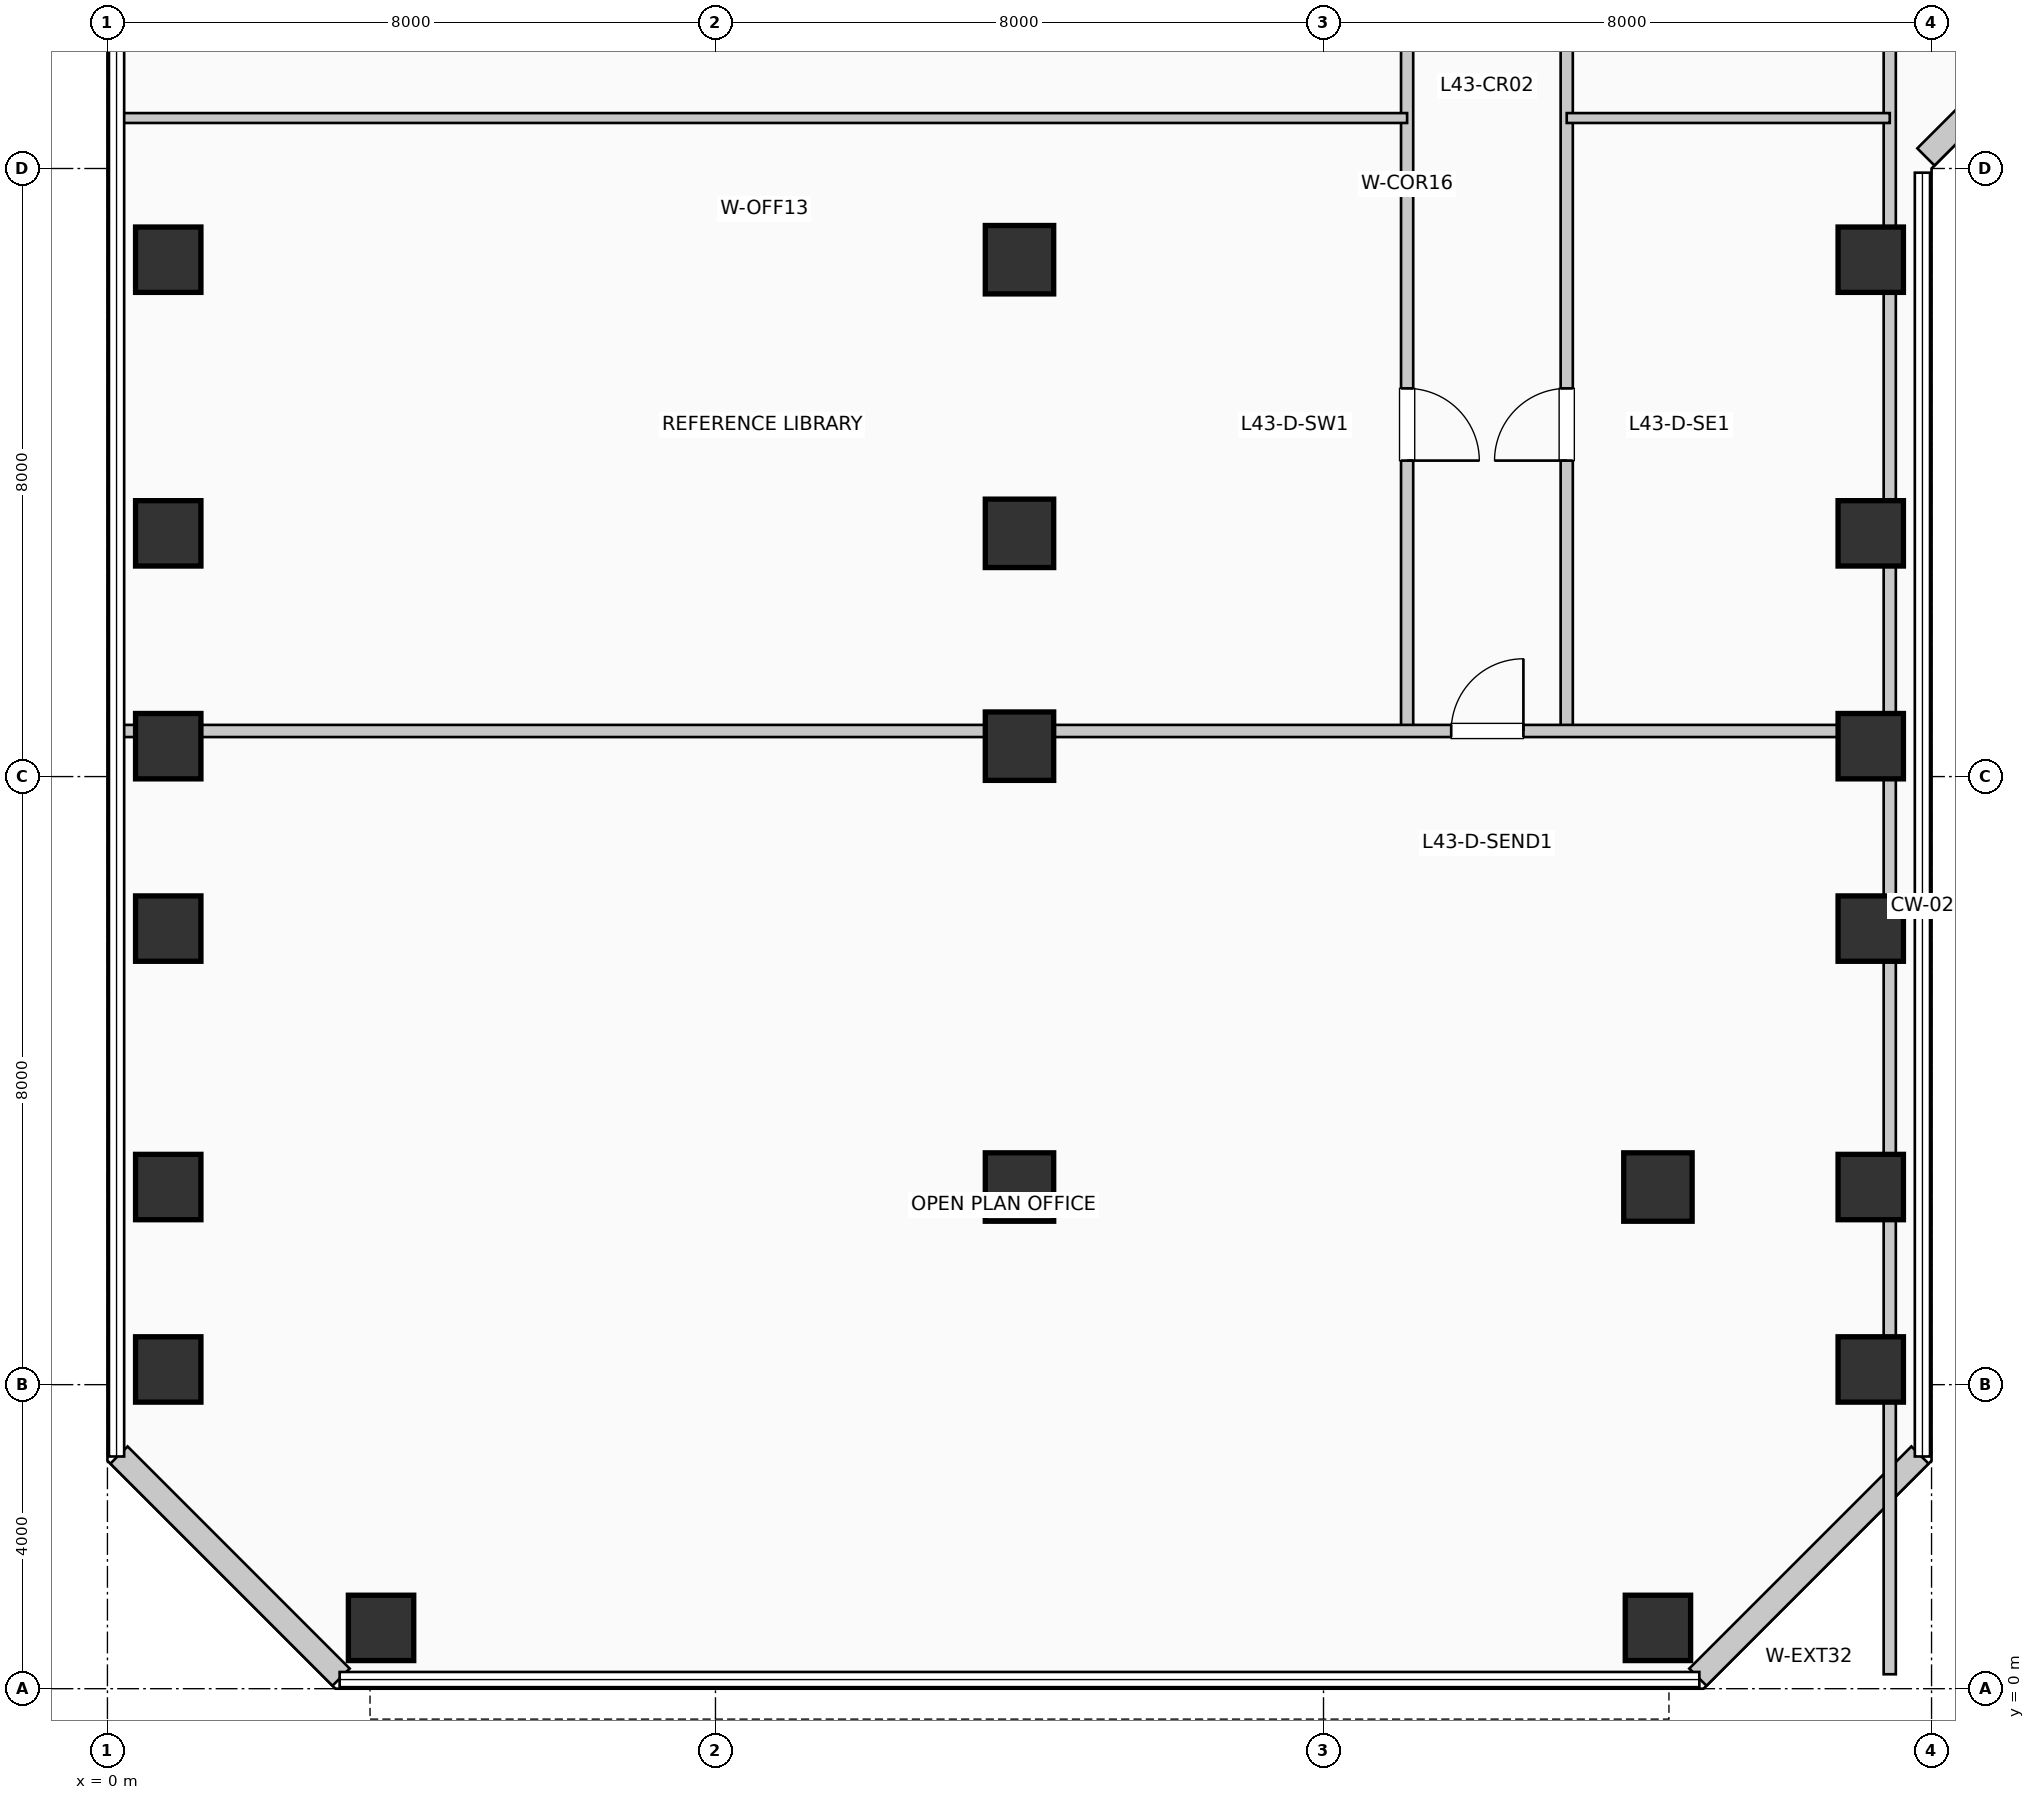
"""IFC4 building model, lengths in metres.
Left out: names, types, materials, properties, quantities, classifications, styles, units other than length and angle.
Written with IfcOpenShell. Run it as: python <this file> out.ifc"""

import sys

from ifc_helpers import new_model, si_unit, direction, frame, frame_2d, origin, origin_2d, place, context, subcontext, project, spatial, rectangle, extrude, element, fill, save


model = new_model("IFC4")
c1 = context("Model", 3, precision=1e-05, world=origin(), true_north=direction((0.0, 1.0)))
c2 = subcontext(c1, "Body", "Model", "MODEL_VIEW")
j1 = project(units=[si_unit("LENGTHUNIT", "METRE"), si_unit("PLANEANGLEUNIT", "RADIAN")], contexts=[c1])
p1 = place(None, origin())
s1 = spatial("IfcSite", under=j1, at=p1, CompositionType="ELEMENT")
p2 = place(p1, origin())
s2 = spatial("IfcBuilding", under=s1, at=p2, CompositionType="ELEMENT")
p3 = place(p2, frame((0.0, 0.0, 179.52)))
s3 = spatial("IfcBuildingStorey", under=s2, at=p3, CompositionType="ELEMENT", Elevation=179.52)
for number, where, z_axis, x_axis in (
    (1, (0.8, 4.2, 0.0), (0.0, 0.0, 1.0), (1.0, 0.0, 0.0)),
    (2, (0.8, 6.6, 0.0), (0.0, 0.0, 1.0), (1.0, 0.0, 0.0)),
    (3, (0.8, 10.0, 0.0), (0.0, 0.0, 1.0), (1.0, 0.0, 0.0)),
    (4, (0.8, 12.4, 0.0), (0.0, 0.0, 1.0), (1.0, 0.0, 0.0)),
    (5, (0.8, 15.2, 0.0), (0.0, 0.0, 1.0), (1.0, 0.0, 0.0)),
    (6, (0.8, 18.8, 0.0), (0.0, 0.0, 1.0), (1.0, 0.0, 0.0)),
    (7, (3.6, 0.8, 0.0), (0.0, 0.0, 1.0), (1.0, 0.0, 0.0)),
):
    element("IfcColumn", number, at=place(p3, frame(where, z_axis=z_axis, x_axis=x_axis)), inside=s3, PredefinedType="COLUMN", context=c2, shape_type="SweptSolid", body=[
        extrude(rectangle(XDim=0.86, YDim=0.86, at=origin_2d()), origin(), (0.0, 0.0, 1.0), 3.96),
    ])
for number, where, z_axis, x_axis in (
    (8, (12.0, 6.6, 0.0), (0.0, 0.0, 1.0), (1.0, 0.0, 0.0)),
    (9, (12.0, 12.4, 0.0), (0.0, 0.0, 1.0), (1.0, 0.0, 0.0)),
    (10, (12.0, 15.2, 0.0), (0.0, 0.0, 1.0), (1.0, 0.0, 0.0)),
    (11, (12.0, 18.8, 0.0), (0.0, 0.0, 1.0), (1.0, 0.0, 0.0)),
):
    element("IfcColumn", number, at=place(p3, frame(where, z_axis=z_axis, x_axis=x_axis)), inside=s3, PredefinedType="COLUMN", context=c2, shape_type="SweptSolid", body=[
        extrude(rectangle(XDim=0.9, YDim=0.9, at=origin_2d()), origin(), (0.0, 0.0, 1.0), 3.96),
    ])
p4 = place(p3, frame((20.4, 0.8, 0.0), z_axis=(0.0, 0.0, 1.0), x_axis=(1.0, 0.0, 0.0)))
e12 = element("IfcColumn", 12, at=p4, inside=s3, PredefinedType="COLUMN", context=c2, shape_type="SweptSolid", body=[
    extrude(rectangle(XDim=0.86, YDim=0.86, at=origin_2d()), origin(), (0.0, 0.0, 1.0), 3.96),
])
p5 = place(p3, frame((20.4, 6.6, 0.0), z_axis=(0.0, 0.0, 1.0), x_axis=(1.0, 0.0, 0.0)))
e13 = element("IfcColumn", 13, at=p5, inside=s3, PredefinedType="COLUMN", context=c2, shape_type="SweptSolid", body=[
    extrude(rectangle(XDim=0.9, YDim=0.9, at=origin_2d()), origin(), (0.0, 0.0, 1.0), 3.96),
])
for number, where, z_axis, x_axis in (
    (14, (23.2, 4.2, 0.0), (0.0, 0.0, 1.0), (1.0, 0.0, 0.0)),
    (15, (23.2, 6.6, 0.0), (0.0, 0.0, 1.0), (1.0, 0.0, 0.0)),
    (16, (23.2, 10.0, 0.0), (0.0, 0.0, 1.0), (1.0, 0.0, 0.0)),
    (17, (23.2, 12.4, 0.0), (0.0, 0.0, 1.0), (1.0, 0.0, 0.0)),
    (18, (23.2, 15.2, 0.0), (0.0, 0.0, 1.0), (1.0, 0.0, 0.0)),
    (19, (23.2, 18.8, 0.0), (0.0, 0.0, 1.0), (1.0, 0.0, 0.0)),
):
    element("IfcColumn", number, at=place(p3, frame(where, z_axis=z_axis, x_axis=x_axis)), inside=s3, PredefinedType="COLUMN", context=c2, shape_type="SweptSolid", body=[
        extrude(rectangle(XDim=0.86, YDim=0.86, at=origin_2d()), origin(), (0.0, 0.0, 1.0), 3.96),
    ])
p6 = place(p3, frame((20.926, 0.152, 0.0), z_axis=(0.0, 0.0, 1.0), x_axis=(0.707106781187, 0.707106781187, 0.0)))
e20 = element("IfcWall", 20, at=p6, inside=s3, PredefinedType="SOLIDWALL", context=c2, shape_type="SweptSolid", body=[
    extrude(rectangle(XDim=4.133, YDim=0.32, at=frame_2d((2.066, 0.0))), origin(), (0.0, 0.0, 1.0), 3.71),
])
p7 = place(p3, frame((23.926, 20.152, 0.0), z_axis=(0.0, 0.0, 1.0), x_axis=(0.707106781187, 0.707106781187, 0.0)))
e21 = element("IfcWall", 21, at=p7, inside=s3, PredefinedType="SOLIDWALL", context=c2, shape_type="SweptSolid", body=[
    extrude(rectangle(XDim=2.718, YDim=0.32, at=frame_2d((1.359, 0.0))), origin(), (0.0, 0.0, 1.0), 3.71),
])
p8 = place(p3, frame((0.152, 3.074, 0.0), z_axis=(0.0, 0.0, 1.0), x_axis=(0.707106781187, -0.707106781187, 0.0)))
e22 = element("IfcWall", 22, at=p8, inside=s3, PredefinedType="SOLIDWALL", context=c2, shape_type="SweptSolid", body=[
    extrude(rectangle(XDim=4.133, YDim=0.32, at=frame_2d((2.066, 0.0))), origin(), (0.0, 0.0, 1.0), 3.71),
])
p9 = place(p3, frame((17.1, 12.6, 0.0), z_axis=(0.0, 0.0, 1.0), x_axis=(0.0, 1.0, 0.0)))
e23 = element("IfcWall", 23, at=p9, inside=s3, PredefinedType="PARTITIONING", context=c2, shape_type="SweptSolid", body=[
    extrude(rectangle(XDim=16.8, YDim=0.16, at=frame_2d((8.4, 0.0))), origin(), (0.0, 0.0, 1.0), 3.71),
])
p10 = place(p9, frame((4.507, 0.0, 0.0), z_axis=(0.0, 0.0, 1.0), x_axis=(-1.0, 0.0, 0.0)))
e24 = element("IfcOpeningElement", 24, at=p10, cuts=e23, PredefinedType="OPENING", context=c2, shape_type="SweptSolid", body=[
    extrude(rectangle(XDim=0.95, YDim=2.15, at=frame_2d((0.475, 1.075))), frame((0.0, 0.09, 0.0), z_axis=(0.0, -1.0, 0.0), x_axis=(1.0, 0.0, 0.0)), (0.0, 0.0, 1.0), 0.18),
])
p11 = place(p9, frame((12.907, 0.0, 0.0), z_axis=(0.0, 0.0, 1.0), x_axis=(-1.0, 0.0, 0.0)))
e25 = element("IfcOpeningElement", 25, at=p11, cuts=e23, PredefinedType="OPENING", context=c2, shape_type="SweptSolid", body=[
    extrude(rectangle(XDim=0.95, YDim=2.15, at=frame_2d((0.475, 1.075))), frame((0.0, 0.09, 0.0), z_axis=(0.0, -1.0, 0.0), x_axis=(1.0, 0.0, 0.0)), (0.0, 0.0, 1.0), 0.18),
])
p12 = place(p3, frame((19.2, 12.6, 0.0), z_axis=(0.0, 0.0, 1.0), x_axis=(0.0, 1.0, 0.0)))
e26 = element("IfcWall", 26, at=p12, inside=s3, PredefinedType="PARTITIONING", context=c2, shape_type="SweptSolid", body=[
    extrude(rectangle(XDim=16.8, YDim=0.16, at=frame_2d((8.4, 0.0))), origin(), (0.0, 0.0, 1.0), 3.71),
])
p13 = place(p12, frame((3.557, 0.0, 0.0)))
e27 = element("IfcOpeningElement", 27, at=p13, cuts=e26, PredefinedType="OPENING", context=c2, shape_type="SweptSolid", body=[
    extrude(rectangle(XDim=0.95, YDim=2.15, at=frame_2d((0.475, 1.075))), frame((0.0, 0.09, 0.0), z_axis=(0.0, -1.0, 0.0), x_axis=(1.0, 0.0, 0.0)), (0.0, 0.0, 1.0), 0.18),
])
p14 = place(p12, frame((11.957, 0.0, 0.0)))
e28 = element("IfcOpeningElement", 28, at=p14, cuts=e26, PredefinedType="OPENING", context=c2, shape_type="SweptSolid", body=[
    extrude(rectangle(XDim=0.95, YDim=2.15, at=frame_2d((0.475, 1.075))), frame((0.0, 0.09, 0.0), z_axis=(0.0, -1.0, 0.0), x_axis=(1.0, 0.0, 0.0)), (0.0, 0.0, 1.0), 0.18),
])
p15 = place(p3, frame((0.19, 12.6, 0.0), z_axis=(0.0, 0.0, 1.0), x_axis=(1.0, 0.0, 0.0)))
e29 = element("IfcWall", 29, at=p15, inside=s3, PredefinedType="PARTITIONING", context=c2, shape_type="SweptSolid", body=[
    extrude(rectangle(XDim=23.26, YDim=0.16, at=frame_2d((11.63, 0.0))), origin(), (0.0, 0.0, 1.0), 3.045),
])
p16 = place(p15, frame((17.49, 0.0, 0.0)))
e30 = element("IfcOpeningElement", 30, at=p16, cuts=e29, PredefinedType="OPENING", context=c2, shape_type="SweptSolid", body=[
    extrude(rectangle(XDim=0.95, YDim=2.15, at=frame_2d((0.475, 1.075))), frame((0.0, 0.09, 0.0), z_axis=(0.0, -1.0, 0.0), x_axis=(1.0, 0.0, 0.0)), (0.0, 0.0, 1.0), 0.18),
])
p17 = place(p3, frame((23.45, 0.19, 0.0), z_axis=(0.0, 0.0, 1.0), x_axis=(0.0, 1.0, 0.0)))
e31 = element("IfcWall", 31, at=p17, inside=s3, PredefinedType="PARTITIONING", context=c2, shape_type="SweptSolid", body=[
    extrude(rectangle(XDim=29.21, YDim=0.16, at=frame_2d((14.605, 0.0))), origin(), (0.0, 0.0, 1.0), 3.045),
])
p18 = place(p3, frame((0.19, 20.664, 0.0), z_axis=(0.0, 0.0, 1.0), x_axis=(1.0, 0.0, 0.0)))
e32 = element("IfcWall", 32, at=p18, inside=s3, PredefinedType="PARTITIONING", context=c2, shape_type="SweptSolid", body=[
    extrude(rectangle(XDim=16.91, YDim=0.13, at=frame_2d((8.455, 0.0))), origin(), (0.0, 0.0, 1.0), 3.71),
])
p19 = place(p3, frame((19.2, 20.664, 0.0), z_axis=(0.0, 0.0, 1.0), x_axis=(1.0, 0.0, 0.0)))
e33 = element("IfcWall", 33, at=p19, inside=s3, PredefinedType="PARTITIONING", context=c2, shape_type="SweptSolid", body=[
    extrude(rectangle(XDim=4.25, YDim=0.13, at=frame_2d((2.125, 0.0))), origin(), (0.0, 0.0, 1.0), 3.71),
])
p20 = place(p16, origin())
e34 = element("IfcDoor", 34, at=p20, inside=s3, OperationType="SINGLE_SWING_RIGHT", PredefinedType="DOOR", context=c2, shape_type="SweptSolid", body=[
    extrude(rectangle(XDim=0.95, YDim=2.15, at=frame_2d((0.475, 1.075))), frame((0.0, 0.025, 0.0), z_axis=(0.0, -1.0, 0.0), x_axis=(1.0, 0.0, 0.0)), (0.0, 0.0, 1.0), 0.05),
])
fill(e30, e34)
p21 = place(p10, origin())
e35 = element("IfcDoor", 35, at=p21, inside=s3, OperationType="SINGLE_SWING_LEFT", PredefinedType="DOOR", context=c2, shape_type="SweptSolid", body=[
    extrude(rectangle(XDim=0.95, YDim=2.15, at=frame_2d((0.475, 1.075))), frame((0.0, 0.025, 0.0), z_axis=(0.0, -1.0, 0.0), x_axis=(1.0, 0.0, 0.0)), (0.0, 0.0, 1.0), 0.05),
])
fill(e24, e35)
p22 = place(p13, origin())
e36 = element("IfcDoor", 36, at=p22, inside=s3, OperationType="SINGLE_SWING_LEFT", PredefinedType="DOOR", context=c2, shape_type="SweptSolid", body=[
    extrude(rectangle(XDim=0.95, YDim=2.15, at=frame_2d((0.475, 1.075))), frame((0.0, 0.025, 0.0), z_axis=(0.0, -1.0, 0.0), x_axis=(1.0, 0.0, 0.0)), (0.0, 0.0, 1.0), 0.05),
])
fill(e27, e36)
save(model, sys.argv[1])
